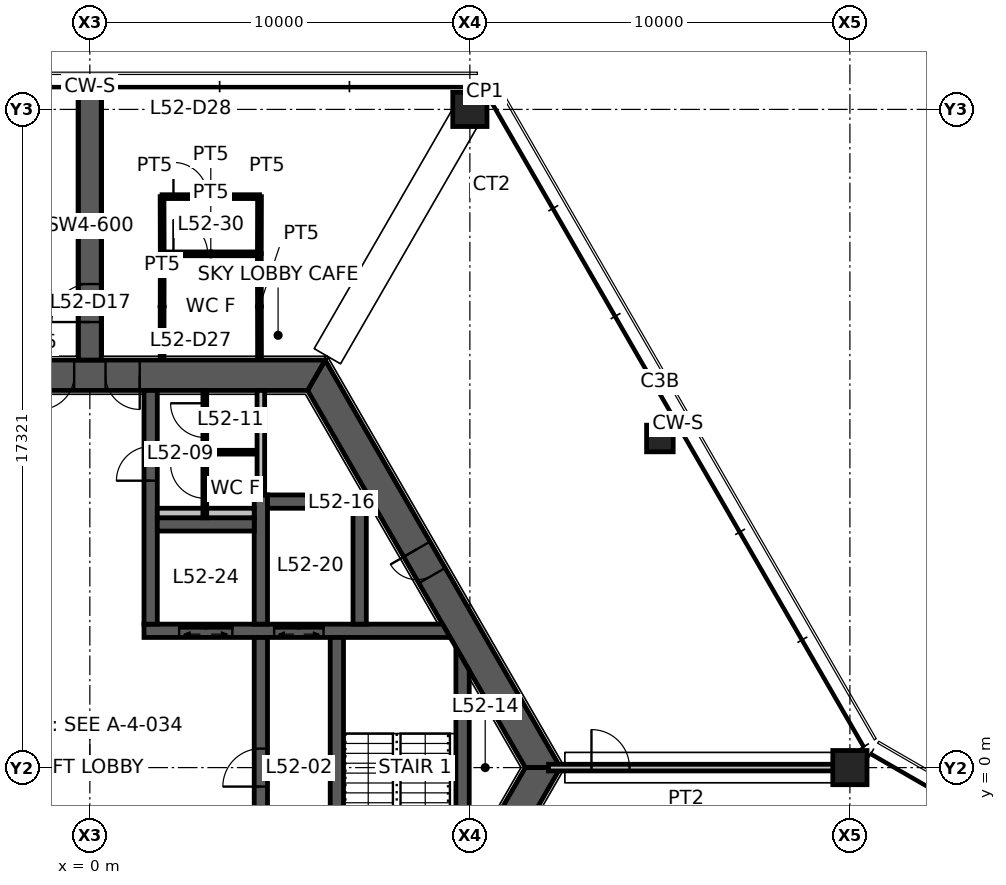
"""IFC4 building model, lengths in metres.
Left out: names, types, materials, properties, quantities, classifications, styles, units other than length and angle.
Written with IfcOpenShell. Run it as: python <this file> out.ifc"""

import sys

from ifc_helpers import new_model, si_unit, direction, frame, frame_2d, origin, origin_2d, place, context, subcontext, project, spatial, polyline, rectangle, hollow_rectangle, outline, extrude, element, fill, save


model = new_model("IFC4")
c1 = context("Model", 3, precision=1e-05, world=origin(), true_north=direction((0.0, 1.0)))
c2 = subcontext(c1, "Body", "Model", "MODEL_VIEW")
j1 = project(units=[si_unit("LENGTHUNIT", "METRE"), si_unit("PLANEANGLEUNIT", "RADIAN")], contexts=[c1])
p1 = place(None, origin())
s1 = spatial("IfcSite", under=j1, at=p1, CompositionType="ELEMENT")
p2 = place(p1, origin())
s2 = spatial("IfcBuilding", under=s1, at=p2, CompositionType="ELEMENT")
p3 = place(p2, frame((0.0, 0.0, 208.3)))
s3 = spatial("IfcBuildingStorey", under=s2, at=p3, CompositionType="ELEMENT", Elevation=208.3)
for number, where, z_axis, x_axis in (
    (1, (20.0, 0.0, 0.0), (0.0, 0.0, 1.0), (1.0, 0.0, 0.0)),
    (2, (10.0, 17.321, 0.0), (0.0, 0.0, 1.0), (1.0, 0.0, 0.0)),
):
    element("IfcColumn", number, at=place(p3, frame(where, z_axis=z_axis, x_axis=x_axis)), inside=s3, PredefinedType="COLUMN", context=c2, shape_type="SweptSolid", body=[
        extrude(hollow_rectangle(XDim=0.9, YDim=0.9, WallThickness=0.09, at=origin_2d()), origin(), (0.0, 0.0, 1.0), 4.5),
    ])
p4 = place(p3, frame((15.0, 8.66, 0.0), z_axis=(0.0, 0.0, 1.0), x_axis=(1.0, 0.0, 0.0)))
e3 = element("IfcColumn", 3, at=p4, inside=s3, PredefinedType="COLUMN", context=c2, shape_type="SweptSolid", body=[
    extrude(hollow_rectangle(XDim=0.7, YDim=0.7, WallThickness=0.036, at=origin_2d()), origin(), (0.0, 0.0, 1.0), 4.5),
])
p5 = place(p3, frame((11.922, 0.0, 0.0), z_axis=(0.0, 0.0, 1.0), x_axis=(-0.500004296715, 0.866022923061, 0.0)))
e4 = element("IfcWall", 4, at=p5, inside=s3, PredefinedType="SHEAR", context=c2, shape_type="SweptSolid", body=[
    extrude(outline(polyline([(-0.231, -0.4), (5.835, -0.4), (6.635, -0.4), (12.153, -0.4), (11.691, 0.4), (6.635, 0.4), (5.835, 0.4), (0.231, 0.4), (-0.231, -0.4)])), origin(), (0.0, 0.0, 1.0), 4.5),
])
p6 = place(p5, frame((5.835, 0.0, 0.0)))
e5 = element("IfcOpeningElement", 5, at=p6, cuts=e4, PredefinedType="OPENING", context=c2, shape_type="SweptSolid", body=[
    extrude(rectangle(XDim=0.8, YDim=2.1, at=frame_2d((0.4, 1.05))), frame((0.0, 0.41, 0.0), z_axis=(0.0, -1.0, 0.0), x_axis=(1.0, 0.0, 0.0)), (0.0, 0.0, 1.0), 0.82),
])
p7 = place(p3, frame((5.961, 10.325, 0.0), z_axis=(0.0, 0.0, 1.0), x_axis=(-1.0, 0.0, 0.0)))
e6 = element("IfcWall", 6, at=p7, inside=s3, PredefinedType="SHEAR", context=c2, shape_type="SweptSolid", body=[
    extrude(outline(polyline([(-0.231, -0.4), (4.649, -0.4), (5.549, -0.4), (6.374, -0.4), (7.273, -0.4), (12.153, -0.4), (11.691, 0.4), (7.273, 0.4), (6.374, 0.4), (5.549, 0.4), (4.649, 0.4), (0.231, 0.4), (-0.231, -0.4)])), origin(), (0.0, 0.0, 1.0), 4.5),
])
p8 = place(p7, frame((6.374, 0.0, 0.0)))
e7 = element("IfcOpeningElement", 7, at=p8, cuts=e6, PredefinedType="OPENING", context=c2, shape_type="SweptSolid", body=[
    extrude(rectangle(XDim=0.9, YDim=2.1, at=frame_2d((0.45, 1.05))), frame((0.0, 0.41, 0.0), z_axis=(0.0, -1.0, 0.0), x_axis=(1.0, 0.0, 0.0)), (0.0, 0.0, 1.0), 0.82),
])
p9 = place(p7, frame((4.649, 0.0, 0.0)))
e8 = element("IfcOpeningElement", 8, at=p9, cuts=e6, PredefinedType="OPENING", context=c2, shape_type="SweptSolid", body=[
    extrude(rectangle(XDim=0.9, YDim=2.1, at=frame_2d((0.45, 1.05))), frame((0.0, 0.41, 0.0), z_axis=(0.0, -1.0, 0.0), x_axis=(1.0, 0.0, 0.0)), (0.0, 0.0, 1.0), 0.82),
])
p10 = place(p3, frame((5.961, -10.325, 0.0), z_axis=(0.0, 0.0, 1.0), x_axis=(0.500004296715, 0.866022923061, 0.0)))
e9 = element("IfcWall", 9, at=p10, inside=s3, PredefinedType="SHEAR", context=c2, shape_type="SweptSolid", body=[
    extrude(outline(polyline([(-0.231, -0.4), (4.594, -0.4), (5.394, -0.4), (12.153, -0.4), (11.691, 0.4), (5.394, 0.4), (4.594, 0.4), (0.231, 0.4), (-0.231, -0.4)])), origin(), (0.0, 0.0, 1.0), 4.5),
])
p11 = place(p10, frame((4.594, 0.0, 0.0)))
e10 = element("IfcOpeningElement", 10, at=p11, cuts=e9, PredefinedType="OPENING", context=c2, shape_type="SweptSolid", body=[
    extrude(rectangle(XDim=0.8, YDim=2.1, at=frame_2d((0.4, 1.05))), frame((0.0, 0.41, 0.0), z_axis=(0.0, -1.0, 0.0), x_axis=(1.0, 0.0, 0.0)), (0.0, 0.0, 1.0), 0.82),
])
p12 = place(p3, frame((0.0, 10.725, 0.0), z_axis=(0.0, 0.0, 1.0), x_axis=(0.0, 1.0, 0.0)))
e11 = element("IfcWall", 11, at=p12, inside=s3, PredefinedType="SHEAR", context=c2, shape_type="SweptSolid", body=[
    extrude(rectangle(XDim=7.045, YDim=0.6, at=frame_2d((3.523, 0.0))), origin(), (0.0, 0.0, 1.0), 4.5),
])
p13 = place(p12, frame((1.0, 0.0, 0.0)))
e12 = element("IfcOpeningElement", 12, at=p13, cuts=e11, PredefinedType="OPENING", context=c2, shape_type="SweptSolid", body=[
    extrude(rectangle(XDim=1.0, YDim=2.1, at=frame_2d((0.5, 1.05))), frame((0.0, 0.31, 0.0), z_axis=(0.0, -1.0, 0.0), x_axis=(1.0, 0.0, 0.0)), (0.0, 0.0, 1.0), 0.62),
])
p14 = place(p3, frame((1.425, 3.6, 0.0), z_axis=(0.0, 0.0, 1.0), x_axis=(1.0, 0.0, 0.0)))
e13 = element("IfcWall", 13, at=p14, inside=s3, PredefinedType="SHEAR", context=c2, shape_type="SweptSolid", body=[
    extrude(outline(polyline([(0.0, -0.175), (0.925, -0.175), (2.325, -0.175), (3.425, -0.175), (4.725, -0.175), (8.058, -0.175), (7.856, 0.175), (4.725, 0.175), (3.425, 0.175), (2.325, 0.175), (0.925, 0.175), (0.0, 0.175), (0.0, -0.175)])), origin(), (0.0, 0.0, 1.0), 4.5),
])
p15 = place(p14, frame((0.925, 0.0, 0.0)))
e14 = element("IfcOpeningElement", 14, at=p15, cuts=e13, PredefinedType="OPENING", context=c2, shape_type="SweptSolid", body=[
    extrude(rectangle(XDim=1.4, YDim=2.1, at=frame_2d((0.7, 1.05))), frame((0.0, 0.185, 0.0), z_axis=(0.0, -1.0, 0.0), x_axis=(1.0, 0.0, 0.0)), (0.0, 0.0, 1.0), 0.37),
])
p16 = place(p14, frame((3.425, 0.0, 0.0)))
e15 = element("IfcOpeningElement", 15, at=p16, cuts=e13, PredefinedType="OPENING", context=c2, shape_type="SweptSolid", body=[
    extrude(rectangle(XDim=1.3, YDim=2.1, at=frame_2d((0.65, 1.05))), frame((0.0, 0.185, 0.0), z_axis=(0.0, -1.0, 0.0), x_axis=(1.0, 0.0, 0.0)), (0.0, 0.0, 1.0), 0.37),
])
p17 = place(p3, frame((1.6, 3.775, 0.0), z_axis=(0.0, 0.0, 1.0), x_axis=(0.0, 1.0, 0.0)))
e16 = element("IfcWall", 16, at=p17, inside=s3, PredefinedType="SHEAR", context=c2, shape_type="SweptSolid", body=[
    extrude(rectangle(XDim=6.15, YDim=0.35, at=frame_2d((3.075, 0.0))), origin(), (0.0, 0.0, 1.0), 4.5),
])
p18 = place(p17, frame((3.775, 0.0, 0.0)))
e17 = element("IfcOpeningElement", 17, at=p18, cuts=e16, PredefinedType="OPENING", context=c2, shape_type="SweptSolid", body=[
    extrude(rectangle(XDim=0.9, YDim=2.1, at=frame_2d((0.45, 1.05))), frame((0.0, 0.185, 0.0), z_axis=(0.0, -1.0, 0.0), x_axis=(1.0, 0.0, 0.0)), (0.0, 0.0, 1.0), 0.37),
])
p19 = place(p3, frame((4.5, -3.425, 0.0), z_axis=(0.0, 0.0, 1.0), x_axis=(0.0, 1.0, 0.0)))
e18 = element("IfcWall", 18, at=p19, inside=s3, PredefinedType="SHEAR", context=c2, shape_type="SweptSolid", body=[
    extrude(rectangle(XDim=6.85, YDim=0.35, at=frame_2d((3.425, 0.0))), origin(), (0.0, 0.0, 1.0), 4.5),
])
p20 = place(p19, frame((2.925, 0.0, 0.0)))
e19 = element("IfcOpeningElement", 19, at=p20, cuts=e18, PredefinedType="OPENING", context=c2, shape_type="SweptSolid", body=[
    extrude(rectangle(XDim=1.0, YDim=2.1, at=frame_2d((0.5, 1.05))), frame((0.0, 0.185, 0.0), z_axis=(0.0, -1.0, 0.0), x_axis=(1.0, 0.0, 0.0)), (0.0, 0.0, 1.0), 0.37),
])
p21 = place(p3, frame((6.5, -3.425, 0.0), z_axis=(0.0, 0.0, 1.0), x_axis=(0.0, 1.0, 0.0)))
e20 = element("IfcWall", 20, at=p21, inside=s3, PredefinedType="SHEAR", context=c2, shape_type="SweptSolid", body=[
    extrude(rectangle(XDim=6.85, YDim=0.35, at=frame_2d((3.425, 0.0))), origin(), (0.0, 0.0, 1.0), 4.5),
])
p22 = place(p21, frame((0.1, 0.0, 0.0)))
e21 = element("IfcOpeningElement", 21, at=p22, cuts=e20, PredefinedType="OPENING", context=c2, shape_type="SweptSolid", body=[
    extrude(rectangle(XDim=1.0, YDim=2.1, at=frame_2d((0.5, 1.05))), frame((0.0, 0.185, 0.0), z_axis=(0.0, -1.0, 0.0), x_axis=(1.0, 0.0, 0.0)), (0.0, 0.0, 1.0), 0.37),
])
p23 = place(p3, frame((4.5, 3.775, 0.0), z_axis=(0.0, 0.0, 1.0), x_axis=(0.0, 1.0, 0.0)))
e22 = element("IfcWall", 22, at=p23, inside=s3, PredefinedType="SHEAR", context=c2, shape_type="SweptSolid", body=[
    extrude(rectangle(XDim=3.4, YDim=0.35, at=frame_2d((1.7, 0.0))), origin(), (0.0, 0.0, 1.0), 4.5),
])
p24 = place(p3, frame((1.775, 6.4, 0.0), z_axis=(0.0, 0.0, 1.0), x_axis=(1.0, 0.0, 0.0)))
e23 = element("IfcWall", 23, at=p24, inside=s3, PredefinedType="SHEAR", context=c2, shape_type="SweptSolid", body=[
    extrude(rectangle(XDim=2.55, YDim=0.35, at=frame_2d((1.275, 0.0))), origin(), (0.0, 0.0, 1.0), 4.5),
])
p25 = place(p3, frame((4.675, 7.0, 0.0), z_axis=(0.0, 0.0, 1.0), x_axis=(1.0, 0.0, 0.0)))
e24 = element("IfcWall", 24, at=p25, inside=s3, PredefinedType="SHEAR", context=c2, shape_type="SweptSolid", body=[
    extrude(rectangle(XDim=2.6, YDim=0.35, at=frame_2d((1.3, 0.0))), origin(), (0.0, 0.0, 1.0), 4.5),
])
p26 = place(p3, frame((7.1, 3.775, 0.0), z_axis=(0.0, 0.0, 1.0), x_axis=(0.0, 1.0, 0.0)))
e25 = element("IfcWall", 25, at=p26, inside=s3, PredefinedType="SHEAR", context=c2, shape_type="SweptSolid", body=[
    extrude(rectangle(XDim=3.05, YDim=0.35, at=frame_2d((1.525, 0.0))), origin(), (0.0, 0.0, 1.0), 4.5),
])
p27 = place(p3, frame((9.808, -2.862, 0.0), z_axis=(0.0, 0.0, 1.0), x_axis=(0.0, 1.0, 0.0)))
e26 = element("IfcWall", 26, at=p27, inside=s3, PredefinedType="SHEAR", context=c2, shape_type="SweptSolid", body=[
    extrude(outline(polyline([(0.303, -0.175), (5.421, -0.175), (6.028, 0.175), (-0.303, 0.175), (0.303, -0.175)])), origin(), (0.0, 0.0, 1.0), 4.5),
])
p28 = place(p3, frame((4.5, 7.175, 0.0), z_axis=(0.0, 0.0, 1.0), x_axis=(0.0, 1.0, 0.0)))
e27 = element("IfcWall", 27, at=p28, inside=s3, PredefinedType="STANDARD", context=c2, shape_type="SweptSolid", body=[
    extrude(rectangle(XDim=2.75, YDim=0.2, at=frame_2d((1.375, 0.0))), origin(), (0.0, 0.0, 1.0), 4.5),
])
p29 = place(p3, frame((1.775, 6.7, 0.0), z_axis=(0.0, 0.0, 1.0), x_axis=(1.0, 0.0, 0.0)))
e28 = element("IfcWall", 28, at=p29, inside=s3, PredefinedType="PLUMBINGWALL", context=c2, shape_type="SweptSolid", body=[
    extrude(rectangle(XDim=2.55, YDim=0.25, at=frame_2d((1.275, 0.0))), origin(), (0.0, 0.0, 1.0), 4.5),
])
p30 = place(p3, frame((3.025, 6.575, 0.0), z_axis=(0.0, 0.0, 1.0), x_axis=(0.0, 1.0, 0.0)))
e29 = element("IfcWall", 29, at=p30, inside=s3, PredefinedType="PARTITIONING", context=c2, shape_type="SweptSolid", body=[
    extrude(rectangle(XDim=3.35, YDim=0.1, at=frame_2d((1.675, 0.0))), origin(), (0.0, 0.0, 1.0), 3.55),
])
p31 = place(p30, frame((0.512, 0.0, 0.0)))
e30 = element("IfcOpeningElement", 30, at=p31, cuts=e29, PredefinedType="OPENING", context=c2, shape_type="SweptSolid", body=[
    extrude(rectangle(XDim=0.9, YDim=2.1, at=frame_2d((0.45, 1.05))), frame((0.0, 0.06, 0.0), z_axis=(0.0, -1.0, 0.0), x_axis=(1.0, 0.0, 0.0)), (0.0, 0.0, 1.0), 0.12),
])
p32 = place(p30, frame((2.113, 0.0, 0.0)))
e31 = element("IfcOpeningElement", 31, at=p32, cuts=e29, PredefinedType="OPENING", context=c2, shape_type="SweptSolid", body=[
    extrude(rectangle(XDim=0.9, YDim=2.1, at=frame_2d((0.45, 1.05))), frame((0.0, 0.06, 0.0), z_axis=(0.0, -1.0, 0.0), x_axis=(1.0, 0.0, 0.0)), (0.0, 0.0, 1.0), 0.12),
])
p33 = place(p3, frame((3.075, 8.3, 0.0), z_axis=(0.0, 0.0, 1.0), x_axis=(1.0, 0.0, 0.0)))
e32 = element("IfcWall", 32, at=p33, inside=s3, PredefinedType="PARTITIONING", context=c2, shape_type="SweptSolid", body=[
    extrude(rectangle(XDim=1.25, YDim=0.1, at=frame_2d((0.625, 0.0))), origin(), (0.0, 0.0, 1.0), 3.55),
])
p34 = place(p3, frame((12.07, 0.0, 0.0), z_axis=(0.0, 0.0, 1.0), x_axis=(1.0, 0.0, 0.0)))
e33 = element("IfcWall", 33, at=p34, inside=s3, PredefinedType="PARTITIONING", context=c2, shape_type="SweptSolid", body=[
    extrude(rectangle(XDim=7.93, YDim=0.175, at=frame_2d((3.965, 0.0))), origin(), (0.0, 0.0, 1.0), 3.65),
])
p35 = place(p34, frame((1.13, 0.0, 0.0)))
e34 = element("IfcOpeningElement", 34, at=p35, cuts=e33, PredefinedType="OPENING", context=c2, shape_type="SweptSolid", body=[
    extrude(rectangle(XDim=1.0, YDim=2.1, at=frame_2d((0.5, 1.05))), frame((0.0, 0.098, 0.0), z_axis=(0.0, -1.0, 0.0), x_axis=(1.0, 0.0, 0.0)), (0.0, 0.0, 1.0), 0.195),
])
p36 = place(p3, frame((1.9, 13.52, 0.0), z_axis=(0.0, 0.0, 1.0), x_axis=(1.0, 0.0, 0.0)))
e35 = element("IfcWall", 35, at=p36, inside=s3, PredefinedType="PARTITIONING", context=c2, shape_type="SweptSolid", body=[
    extrude(rectangle(XDim=2.565, YDim=0.1, at=frame_2d((1.283, 0.0))), origin(), (0.0, 0.0, 1.0), 3.55),
])
p37 = place(p36, frame((0.3, 0.0, 0.0)))
e36 = element("IfcOpeningElement", 36, at=p37, cuts=e35, PredefinedType="OPENING", context=c2, shape_type="SweptSolid", body=[
    extrude(rectangle(XDim=0.9, YDim=2.1, at=frame_2d((0.45, 1.05))), frame((0.0, 0.06, 0.0), z_axis=(0.0, -1.0, 0.0), x_axis=(1.0, 0.0, 0.0)), (0.0, 0.0, 1.0), 0.12),
])
for number, where, z_axis, x_axis in (
    (37, (1.9, 10.745, 0.0), (0.0, 0.0, 1.0), (0.002, 1.0, 0.0)),
    (38, (4.46, 13.525, 0.0), (0.0, 0.0, 1.0), (0.002, -1.0, 0.0)),
):
    element("IfcWall", number, at=place(p3, frame(where, z_axis=z_axis, x_axis=x_axis)), inside=s3, PredefinedType="PARTITIONING", context=c2, shape_type="SweptSolid", body=[
        extrude(rectangle(XDim=2.78, YDim=0.1, at=frame_2d((1.39, 0.0))), origin(), (0.0, 0.0, 1.0), 3.55),
    ])
p38 = place(p3, frame((1.9, 15.025, 0.0), z_axis=(0.0, 0.0, 1.0), x_axis=(1.0, 0.0, 0.0)))
e39 = element("IfcWall", 39, at=p38, inside=s3, PredefinedType="PARTITIONING", context=c2, shape_type="SweptSolid", body=[
    extrude(rectangle(XDim=2.565, YDim=0.1, at=frame_2d((1.283, 0.0))), origin(), (0.0, 0.0, 1.0), 3.55),
])
p39 = place(p38, frame((0.3, 0.0, 0.0)))
e40 = element("IfcOpeningElement", 40, at=p39, cuts=e39, PredefinedType="OPENING", context=c2, shape_type="SweptSolid", body=[
    extrude(rectangle(XDim=0.9, YDim=2.1, at=frame_2d((0.45, 1.05))), frame((0.0, 0.06, 0.0), z_axis=(0.0, -1.0, 0.0), x_axis=(1.0, 0.0, 0.0)), (0.0, 0.0, 1.0), 0.12),
])
for number, where, z_axis, x_axis in (
    (41, (1.905, 13.525, 0.0), (0.0, 0.0, 1.0), (-0.003, 1.0, 0.0)),
    (42, (4.465, 15.025, 0.0), (0.0, 0.0, 1.0), (-0.003, -1.0, 0.0)),
):
    element("IfcWall", number, at=place(p3, frame(where, z_axis=z_axis, x_axis=x_axis)), inside=s3, PredefinedType="PARTITIONING", context=c2, shape_type="SweptSolid", body=[
        extrude(rectangle(XDim=1.5, YDim=0.1, at=frame_2d((0.75, 0.0))), origin(), (0.0, 0.0, 1.0), 3.55),
    ])
p40 = place(p3, frame((0.0, 17.771, 0.0), z_axis=(0.0, 0.0, 1.0), x_axis=(0.0, 1.0, 0.0)))
e43 = element("IfcWall", 43, at=p40, inside=s3, PredefinedType="PARTITIONING", context=c2, shape_type="SweptSolid", body=[
    extrude(rectangle(XDim=0.045, YDim=0.175, at=frame_2d((0.022, 0.0))), origin(), (0.0, 0.0, 1.0), 4.5),
])
p41 = place(p8, origin())
e44 = element("IfcDoor", 44, at=p41, inside=s3, OperationType="SINGLE_SWING_RIGHT", PredefinedType="DOOR", context=c2, shape_type="SweptSolid", body=[
    extrude(rectangle(XDim=0.9, YDim=2.1, at=frame_2d((0.45, 1.05))), frame((0.0, 0.025, 0.0), z_axis=(0.0, -1.0, 0.0), x_axis=(1.0, 0.0, 0.0)), (0.0, 0.0, 1.0), 0.05),
])
fill(e7, e44)
p42 = place(p9, origin())
e45 = element("IfcDoor", 45, at=p42, inside=s3, OperationType="SINGLE_SWING_LEFT", PredefinedType="DOOR", context=c2, shape_type="SweptSolid", body=[
    extrude(rectangle(XDim=0.9, YDim=2.1, at=frame_2d((0.45, 1.05))), frame((0.0, 0.025, 0.0), z_axis=(0.0, -1.0, 0.0), x_axis=(1.0, 0.0, 0.0)), (0.0, 0.0, 1.0), 0.05),
])
fill(e8, e45)
p43 = place(p6, origin())
e46 = element("IfcDoor", 46, at=p43, inside=s3, OperationType="SINGLE_SWING_RIGHT", PredefinedType="DOOR", context=c2, shape_type="SweptSolid", body=[
    extrude(rectangle(XDim=0.8, YDim=2.1, at=frame_2d((0.4, 1.05))), frame((0.0, 0.025, 0.0), z_axis=(0.0, -1.0, 0.0), x_axis=(1.0, 0.0, 0.0)), (0.0, 0.0, 1.0), 0.05),
])
fill(e5, e46)
p44 = place(p20, origin())
e47 = element("IfcDoor", 47, at=p44, inside=s3, OperationType="SINGLE_SWING_LEFT", PredefinedType="DOOR", context=c2, shape_type="SweptSolid", body=[
    extrude(rectangle(XDim=1.0, YDim=2.1, at=frame_2d((0.5, 1.05))), frame((0.0, 0.025, 0.0), z_axis=(0.0, -1.0, 0.0), x_axis=(1.0, 0.0, 0.0)), (0.0, 0.0, 1.0), 0.05),
])
fill(e19, e47)
p45 = place(p18, origin())
e48 = element("IfcDoor", 48, at=p45, inside=s3, OperationType="SINGLE_SWING_LEFT", PredefinedType="DOOR", context=c2, shape_type="SweptSolid", body=[
    extrude(rectangle(XDim=0.9, YDim=2.1, at=frame_2d((0.45, 1.05))), frame((0.0, 0.025, 0.0), z_axis=(0.0, -1.0, 0.0), x_axis=(1.0, 0.0, 0.0)), (0.0, 0.0, 1.0), 0.05),
])
fill(e17, e48)
p46 = place(p13, origin())
e49 = element("IfcDoor", 49, at=p46, inside=s3, OperationType="SINGLE_SWING_LEFT", PredefinedType="DOOR", context=c2, shape_type="SweptSolid", body=[
    extrude(rectangle(XDim=1.0, YDim=2.1, at=frame_2d((0.5, 1.05))), frame((0.0, 0.025, 0.0), z_axis=(0.0, -1.0, 0.0), x_axis=(1.0, 0.0, 0.0)), (0.0, 0.0, 1.0), 0.05),
])
fill(e12, e49)
p47 = place(p31, origin())
e50 = element("IfcDoor", 50, at=p47, inside=s3, OperationType="SINGLE_SWING_RIGHT", PredefinedType="DOOR", context=c2, shape_type="SweptSolid", body=[
    extrude(rectangle(XDim=0.9, YDim=2.1, at=frame_2d((0.45, 1.05))), frame((0.0, 0.025, 0.0), z_axis=(0.0, -1.0, 0.0), x_axis=(1.0, 0.0, 0.0)), (0.0, 0.0, 1.0), 0.05),
])
fill(e30, e50)
p48 = place(p32, origin())
e51 = element("IfcDoor", 51, at=p48, inside=s3, OperationType="SINGLE_SWING_RIGHT", PredefinedType="DOOR", context=c2, shape_type="SweptSolid", body=[
    extrude(rectangle(XDim=0.9, YDim=2.1, at=frame_2d((0.45, 1.05))), frame((0.0, 0.025, 0.0), z_axis=(0.0, -1.0, 0.0), x_axis=(1.0, 0.0, 0.0)), (0.0, 0.0, 1.0), 0.05),
])
fill(e31, e51)
p49 = place(p35, origin())
e52 = element("IfcDoor", 52, at=p49, inside=s3, OperationType="SINGLE_SWING_LEFT", PredefinedType="DOOR", context=c2, shape_type="SweptSolid", body=[
    extrude(rectangle(XDim=1.0, YDim=2.1, at=frame_2d((0.5, 1.05))), frame((0.0, 0.025, 0.0), z_axis=(0.0, -1.0, 0.0), x_axis=(1.0, 0.0, 0.0)), (0.0, 0.0, 1.0), 0.05),
])
fill(e34, e52)
p50 = place(p37, origin())
e53 = element("IfcDoor", 53, at=p50, inside=s3, OperationType="SINGLE_SWING_LEFT", PredefinedType="DOOR", context=c2, shape_type="SweptSolid", body=[
    extrude(rectangle(XDim=0.9, YDim=2.1, at=frame_2d((0.45, 1.05))), frame((0.0, 0.025, 0.0), z_axis=(0.0, -1.0, 0.0), x_axis=(1.0, 0.0, 0.0)), (0.0, 0.0, 1.0), 0.05),
])
fill(e36, e53)
p51 = place(p39, origin())
e54 = element("IfcDoor", 54, at=p51, inside=s3, OperationType="SINGLE_SWING_LEFT", PredefinedType="DOOR", context=c2, shape_type="SweptSolid", body=[
    extrude(rectangle(XDim=0.9, YDim=2.1, at=frame_2d((0.45, 1.05))), frame((0.0, 0.025, 0.0), z_axis=(0.0, -1.0, 0.0), x_axis=(1.0, 0.0, 0.0)), (0.0, 0.0, 1.0), 0.05),
])
fill(e40, e54)
p52 = place(p15, origin())
e55 = element("IfcDoor", 55, at=p52, inside=s3, OperationType="DOUBLE_DOOR_SLIDING", PredefinedType="DOOR", context=c2, shape_type="SweptSolid", body=[
    extrude(rectangle(XDim=1.4, YDim=2.1, at=frame_2d((0.7, 1.05))), frame((0.0, 0.025, 0.0), z_axis=(0.0, -1.0, 0.0), x_axis=(1.0, 0.0, 0.0)), (0.0, 0.0, 1.0), 0.05),
])
fill(e14, e55)
p53 = place(p16, origin())
e56 = element("IfcDoor", 56, at=p53, inside=s3, OperationType="DOUBLE_DOOR_SLIDING", PredefinedType="DOOR", context=c2, shape_type="SweptSolid", body=[
    extrude(rectangle(XDim=1.3, YDim=2.1, at=frame_2d((0.65, 1.05))), frame((0.0, 0.025, 0.0), z_axis=(0.0, -1.0, 0.0), x_axis=(1.0, 0.0, 0.0)), (0.0, 0.0, 1.0), 0.05),
])
fill(e15, e56)
save(model, sys.argv[1])
